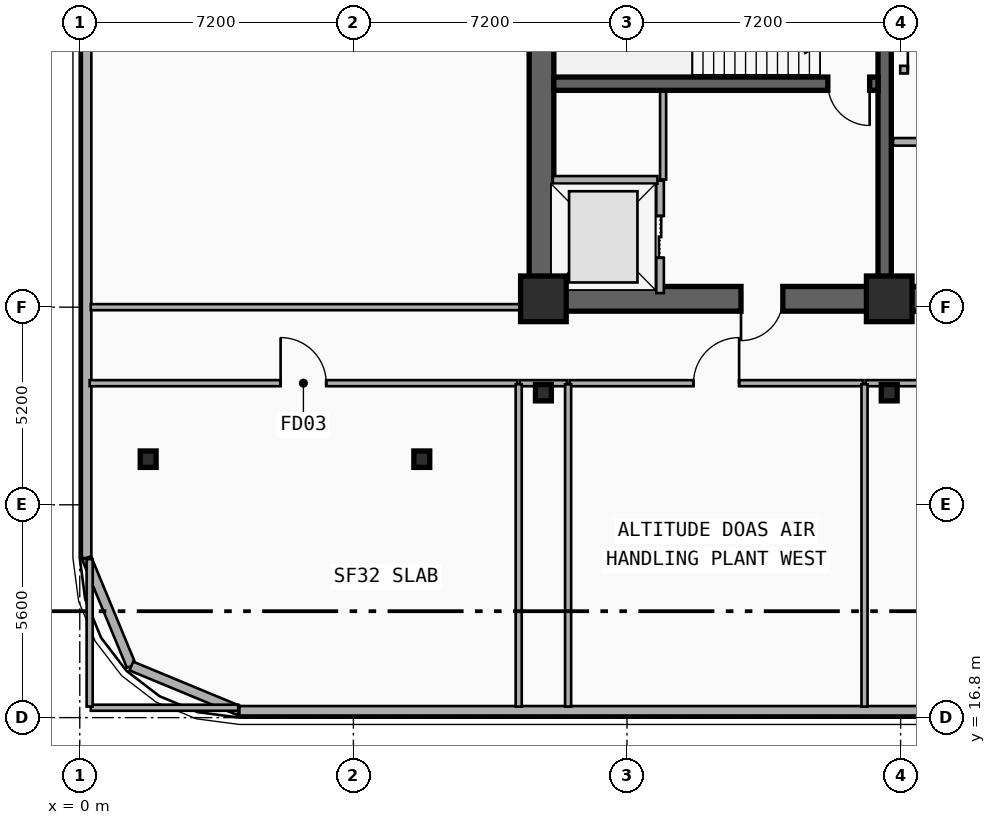
"""IFC4 building model, lengths in metres.
Left out: names, types, materials, properties, quantities, classifications, styles, units other than length and angle.
Written with IfcOpenShell. Run it as: python <this file> out.ifc"""

import sys

from ifc_helpers import new_model, si_unit, direction, frame, frame_2d, origin, origin_2d, place, context, subcontext, project, spatial, rectangle, i_section, extrude, element, fill, save


model = new_model("IFC4")
c1 = context("Model", 3, precision=1e-05, world=origin(), true_north=direction((0.0, 1.0)))
c2 = subcontext(c1, "Body", "Model", "MODEL_VIEW")
j1 = project(units=[si_unit("LENGTHUNIT", "METRE"), si_unit("PLANEANGLEUNIT", "RADIAN")], contexts=[c1])
p1 = place(None, origin())
s1 = spatial("IfcSite", under=j1, at=p1, CompositionType="ELEMENT")
p2 = place(p1, origin())
s2 = spatial("IfcBuilding", under=s1, at=p2, CompositionType="ELEMENT")
p3 = place(p2, frame((0.0, 0.0, 132.9)))
s3 = spatial("IfcBuildingStorey", under=s2, at=p3, CompositionType="ELEMENT", Elevation=132.9)
p4 = place(p3, frame((21.18, 27.82, 0.0), z_axis=(0.0, 0.0, 1.0), x_axis=(-1.0, 0.0, 0.0)))
e1 = element("IfcWall", 1, at=p4, inside=s3, PredefinedType="SHEAR", context=c2, shape_type="SweptSolid", body=[
    extrude(rectangle(XDim=9.03, YDim=0.65, at=frame_2d((4.515, 0.0))), origin(), (0.0, 0.0, 1.0), 4.8),
])
p5 = place(p4, frame((2.68, 0.0, 0.0)))
e2 = element("IfcOpeningElement", 2, at=p5, cuts=e1, PredefinedType="OPENING", context=c2, shape_type="SweptSolid", body=[
    extrude(rectangle(XDim=1.1, YDim=2.15, at=frame_2d((0.55, 1.075))), frame((0.0, 0.335, 0.0), z_axis=(0.0, -1.0, 0.0), x_axis=(1.0, 0.0, 0.0)), (0.0, 0.0, 1.0), 0.67),
])
p6 = place(p3, frame((33.15, 27.82, 0.0), z_axis=(0.0, 0.0, 1.0), x_axis=(-1.0, 0.0, 0.0)))
e3 = element("IfcWall", 3, at=p6, inside=s3, PredefinedType="SHEAR", context=c2, shape_type="SweptSolid", body=[
    extrude(rectangle(XDim=11.97, YDim=0.65, at=frame_2d((5.985, 0.0))), origin(), (0.0, 0.0, 1.0), 4.8),
])
p7 = place(p6, frame((6.1, 0.0, 0.0)))
e4 = element("IfcOpeningElement", 4, at=p7, cuts=e3, PredefinedType="OPENING", context=c2, shape_type="SweptSolid", body=[
    extrude(rectangle(XDim=1.6, YDim=2.2, at=frame_2d((0.8, 1.1))), frame((0.0, 0.335, 0.0), z_axis=(0.0, -1.0, 0.0), x_axis=(1.0, 0.0, 0.0)), (0.0, 0.0, 1.0), 0.67),
])
p8 = place(p3, frame((12.15, 28.145, 0.0), z_axis=(0.0, 0.0, 1.0), x_axis=(0.0, 1.0, 0.0)))
e5 = element("IfcWall", 5, at=p8, inside=s3, PredefinedType="SHEAR", context=c2, shape_type="SweptSolid", body=[
    extrude(rectangle(XDim=8.58, YDim=0.65, at=frame_2d((4.29, 0.0))), origin(), (0.0, 0.0, 1.0), 4.8),
])
p9 = place(p3, frame((21.18, 28.145, 0.0), z_axis=(0.0, 0.0, 1.0), x_axis=(0.0, 1.0, 0.0)))
e6 = element("IfcWall", 6, at=p9, inside=s3, PredefinedType="SHEAR", context=c2, shape_type="SweptSolid", body=[
    extrude(rectangle(XDim=8.58, YDim=0.35, at=frame_2d((4.29, 0.0))), origin(), (0.0, 0.0, 1.0), 4.8),
])
p10 = place(p3, frame((21.005, 33.48, 0.0), z_axis=(0.0, 0.0, 1.0), x_axis=(-1.0, 0.0, 0.0)))
e7 = element("IfcWall", 7, at=p10, inside=s3, PredefinedType="SHEAR", context=c2, shape_type="SweptSolid", body=[
    extrude(rectangle(XDim=8.53, YDim=0.35, at=frame_2d((4.265, 0.0))), origin(), (0.0, 0.0, 1.0), 4.8),
])
p11 = place(p10, frame((0.22, 0.0, 0.0)))
e8 = element("IfcOpeningElement", 8, at=p11, cuts=e7, PredefinedType="OPENING", context=c2, shape_type="SweptSolid", body=[
    extrude(rectangle(XDim=1.1, YDim=2.15, at=frame_2d((0.55, 1.075))), frame((0.0, 0.185, 0.0), z_axis=(0.0, -1.0, 0.0), x_axis=(1.0, 0.0, 0.0)), (0.0, 0.0, 1.0), 0.37),
])
for number, where, z_axis, x_axis in (
    (9, (12.2, 27.82, 0.0), (0.0, 0.0, 1.0), (1.0, 0.0, 0.0)),
    (10, (21.3, 27.82, 0.0), (0.0, 0.0, 1.0), (1.0, 0.0, 0.0)),
):
    element("IfcColumn", number, at=place(p3, frame(where, z_axis=z_axis, x_axis=x_axis)), inside=s3, PredefinedType="COLUMN", context=c2, shape_type="SweptSolid", body=[
        extrude(rectangle(XDim=1.2, YDim=1.2, at=origin_2d()), origin(), (0.0, 0.0, 1.0), 4.8),
    ])
for number, where, z_axis, x_axis in (
    (11, (12.2, 25.35, 0.0), (0.0, 0.0, 1.0), (1.0, 0.0, 0.0)),
    (12, (21.3, 25.35, 0.0), (0.0, 0.0, 1.0), (1.0, 0.0, 0.0)),
    (13, (9.0, 23.6, 0.0), (0.0, 0.0, 1.0), (1.0, 0.0, 0.0)),
    (14, (1.8, 23.6, 0.0), (0.0, 0.0, 1.0), (1.0, 0.0, 0.0)),
):
    element("IfcColumn", number, at=place(p3, frame(where, z_axis=z_axis, x_axis=x_axis)), inside=s3, PredefinedType="COLUMN", context=c2, shape_type="SweptSolid", body=[
        extrude(i_section(OverallWidth=0.418, OverallDepth=0.432, WebThickness=0.035, FlangeThickness=0.056, FilletRadius=0.015, at=origin_2d()), origin(), (0.0, 0.0, 1.0), 4.8),
    ])
p12 = place(p3, frame((0.18, 21.0, 0.0), z_axis=(0.0, 0.0, 1.0), x_axis=(0.0, 1.0, 0.0)))
e15 = element("IfcWall", 15, at=p12, inside=s3, PredefinedType="SOLIDWALL", context=c2, shape_type="SweptSolid", body=[
    extrude(rectangle(XDim=18.0, YDim=0.25, at=frame_2d((9.0, 0.0))), origin(), (0.0, 0.0, 1.0), 4.48),
])
for number, where, z_axis, x_axis in (
    (16, (1.357, 18.157, 0.0), (0.0, 0.0, 1.0), (-0.383, 0.924, 0.0)),
    (17, (4.2, 16.98, 0.0), (0.0, 0.0, 1.0), (-0.924, 0.383, 0.0)),
):
    element("IfcWall", number, at=place(p3, frame(where, z_axis=z_axis, x_axis=x_axis)), inside=s3, PredefinedType="SOLIDWALL", context=c2, shape_type="SweptSolid", body=[
        extrude(rectangle(XDim=3.077, YDim=0.25, at=frame_2d((1.538, 0.0))), origin(), (0.0, 0.0, 1.0), 4.48),
    ])
p13 = place(p3, frame((53.4, 16.98, 0.0), z_axis=(0.0, 0.0, 1.0), x_axis=(-1.0, 0.0, 0.0)))
e18 = element("IfcWall", 18, at=p13, inside=s3, PredefinedType="SOLIDWALL", context=c2, shape_type="SweptSolid", body=[
    extrude(rectangle(XDim=49.2, YDim=0.25, at=frame_2d((24.6, 0.0))), origin(), (0.0, 0.0, 1.0), 3.92),
])
p14 = place(p3, frame((15.27, 27.97, 0.0), z_axis=(0.0, 0.0, 1.0), x_axis=(0.0, 1.0, 0.0)))
e19 = element("IfcWall", 19, at=p14, inside=s3, PredefinedType="PARTITIONING", context=c2, shape_type="SweptSolid", body=[
    extrude(rectangle(XDim=2.96, YDim=0.2, at=frame_2d((1.48, 0.0))), origin(), (0.0, 0.0, 1.0), 3.452),
])
p15 = place(p14, frame((0.93, 0.0, 0.0)))
e20 = element("IfcOpeningElement", 20, at=p15, cuts=e19, PredefinedType="OPENING", context=c2, shape_type="SweptSolid", body=[
    extrude(rectangle(XDim=1.1, YDim=2.15, at=frame_2d((0.55, 1.075))), frame((0.0, 0.11, 0.0), z_axis=(0.0, -1.0, 0.0), x_axis=(1.0, 0.0, 0.0)), (0.0, 0.0, 1.0), 0.22),
])
p16 = place(p3, frame((12.45, 30.95, 0.0), z_axis=(0.0, 0.0, 1.0), x_axis=(1.0, 0.0, 0.0)))
e21 = element("IfcWall", 21, at=p16, inside=s3, PredefinedType="PARTITIONING", context=c2, shape_type="SweptSolid", body=[
    extrude(rectangle(XDim=2.75, YDim=0.2, at=frame_2d((1.375, 0.0))), origin(), (0.0, 0.0, 1.0), 3.452),
])
p17 = place(p3, frame((21.4, 31.95, 0.0), z_axis=(0.0, 0.0, 1.0), x_axis=(1.0, 0.0, 0.0)))
e22 = element("IfcWall", 22, at=p17, inside=s3, PredefinedType="PARTITIONING", context=c2, shape_type="SweptSolid", body=[
    extrude(rectangle(XDim=3.66, YDim=0.2, at=frame_2d((1.83, 0.0))), origin(), (0.0, 0.0, 1.0), 3.452),
])
p18 = place(p17, frame((1.23, 0.0, 0.0)))
e23 = element("IfcOpeningElement", 23, at=p18, cuts=e22, PredefinedType="OPENING", context=c2, shape_type="SweptSolid", body=[
    extrude(rectangle(XDim=1.2, YDim=2.15, at=frame_2d((0.6, 1.075))), frame((0.0, 0.11, 0.0), z_axis=(0.0, -1.0, 0.0), x_axis=(1.0, 0.0, 0.0)), (0.0, 0.0, 1.0), 0.22),
])
p19 = place(p3, frame((21.59, 33.85, 0.0), z_axis=(0.0, 0.0, 1.0), x_axis=(1.0, 0.0, 0.0)))
e24 = element("IfcWall", 24, at=p19, inside=s3, PredefinedType="PARTITIONING", context=c2, shape_type="SweptSolid", body=[
    extrude(rectangle(XDim=2.92, YDim=0.2, at=frame_2d((1.46, 0.0))), origin(), (0.0, 0.0, 1.0), 3.452),
])
p20 = place(p19, frame((0.2, 0.0, 0.0)))
e25 = element("IfcOpeningElement", 25, at=p20, cuts=e24, PredefinedType="OPENING", context=c2, shape_type="SweptSolid", body=[
    extrude(rectangle(XDim=1.2, YDim=2.15, at=frame_2d((0.6, 1.075))), frame((0.0, 0.11, 0.0), z_axis=(0.0, -1.0, 0.0), x_axis=(1.0, 0.0, 0.0)), (0.0, 0.0, 1.0), 0.22),
])
p21 = place(p3, frame((0.26, 25.6, 0.0), z_axis=(0.0, 0.0, 1.0), x_axis=(1.0, 0.0, 0.0)))
e26 = element("IfcWall", 26, at=p21, inside=s3, PredefinedType="PARTITIONING", context=c2, shape_type="SweptSolid", body=[
    extrude(rectangle(XDim=11.25, YDim=0.16, at=frame_2d((5.625, 0.0))), origin(), (0.0, 0.0, 1.0), 3.81),
])
p22 = place(p21, frame((5.025, 0.0, 0.0)))
e27 = element("IfcOpeningElement", 27, at=p22, cuts=e26, PredefinedType="OPENING", context=c2, shape_type="SweptSolid", body=[
    extrude(rectangle(XDim=1.2, YDim=2.15, at=frame_2d((0.6, 1.075))), frame((0.0, 0.09, 0.0), z_axis=(0.0, -1.0, 0.0), x_axis=(1.0, 0.0, 0.0)), (0.0, 0.0, 1.0), 0.18),
])
p23 = place(p3, frame((12.89, 25.6, 0.0), z_axis=(0.0, 0.0, 1.0), x_axis=(1.0, 0.0, 0.0)))
e28 = element("IfcWall", 28, at=p23, inside=s3, PredefinedType="PARTITIONING", context=c2, shape_type="SweptSolid", body=[
    extrude(rectangle(XDim=7.72, YDim=0.16, at=frame_2d((3.86, 0.0))), origin(), (0.0, 0.0, 1.0), 4.48),
])
p24 = place(p23, frame((3.26, 0.0, 0.0)))
e29 = element("IfcOpeningElement", 29, at=p24, cuts=e28, PredefinedType="OPENING", context=c2, shape_type="SweptSolid", body=[
    extrude(rectangle(XDim=1.2, YDim=2.15, at=frame_2d((0.6, 1.075))), frame((0.0, 0.09, 0.0), z_axis=(0.0, -1.0, 0.0), x_axis=(1.0, 0.0, 0.0)), (0.0, 0.0, 1.0), 0.18),
])
p25 = place(p3, frame((15.35, 30.96, 0.0), z_axis=(0.0, 0.0, 1.0), x_axis=(0.0, 1.0, 0.0)))
e30 = element("IfcWall", 30, at=p25, inside=s3, PredefinedType="PARTITIONING", context=c2, shape_type="SweptSolid", body=[
    extrude(rectangle(XDim=2.31, YDim=0.16, at=frame_2d((1.155, 0.0))), origin(), (0.0, 0.0, 1.0), 4.48),
])
p26 = place(p3, frame((11.58, 25.6, 0.0), z_axis=(0.0, 0.0, 1.0), x_axis=(1.0, 0.0, 0.0)))
e31 = element("IfcWall", 31, at=p26, inside=s3, PredefinedType="PARTITIONING", context=c2, shape_type="SweptSolid", body=[
    extrude(rectangle(XDim=1.24, YDim=0.16, at=frame_2d((0.62, 0.0))), origin(), (0.0, 0.0, 1.0), 3.646),
])
p27 = place(p3, frame((20.68, 25.6, 0.0), z_axis=(0.0, 0.0, 1.0), x_axis=(1.0, 0.0, 0.0)))
e32 = element("IfcWall", 32, at=p27, inside=s3, PredefinedType="PARTITIONING", context=c2, shape_type="SweptSolid", body=[
    extrude(rectangle(XDim=16.29, YDim=0.16, at=frame_2d((8.145, 0.0))), origin(), (0.0, 0.0, 1.0), 3.646),
])
p28 = place(p3, frame((0.29, 27.6, 0.0), z_axis=(0.0, 0.0, 1.0), x_axis=(1.0, 0.0, 0.0)))
e33 = element("IfcWall", 33, at=p28, inside=s3, PredefinedType="PARTITIONING", context=c2, shape_type="SweptSolid", body=[
    extrude(rectangle(XDim=11.83, YDim=0.16, at=frame_2d((5.915, 0.0))), origin(), (0.0, 0.0, 1.0), 3.452),
])
p29 = place(p3, frame((0.29, 17.06, 0.0), z_axis=(0.0, 0.0, 1.0), x_axis=(1.0, 0.0, 0.0)))
e34 = element("IfcWall", 34, at=p29, inside=s3, PredefinedType="PARTITIONING", context=c2, shape_type="SweptSolid", body=[
    extrude(rectangle(XDim=3.88, YDim=0.16, at=frame_2d((1.94, 0.0))), origin(), (0.0, 0.0, 1.0), 3.96),
])
p30 = place(p3, frame((0.26, 17.09, 0.0), z_axis=(0.0, 0.0, 1.0), x_axis=(0.0, 1.0, 0.0)))
e35 = element("IfcWall", 35, at=p30, inside=s3, PredefinedType="PARTITIONING", context=c2, shape_type="SweptSolid", body=[
    extrude(rectangle(XDim=3.88, YDim=0.16, at=frame_2d((1.94, 0.0))), origin(), (0.0, 0.0, 1.0), 4.48),
])
p31 = place(p3, frame((11.55, 17.09, 0.0), z_axis=(0.0, 0.0, 1.0), x_axis=(0.0, 1.0, 0.0)))
e36 = element("IfcWall", 36, at=p31, inside=s3, PredefinedType="PARTITIONING", context=c2, shape_type="SweptSolid", body=[
    extrude(rectangle(XDim=8.48, YDim=0.16, at=frame_2d((4.24, 0.0))), origin(), (0.0, 0.0, 1.0), 3.96),
])
for number, where, z_axis, x_axis in (
    (37, (12.85, 17.09, 0.0), (0.0, 0.0, 1.0), (0.0, 1.0, 0.0)),
    (38, (20.65, 17.09, 0.0), (0.0, 0.0, 1.0), (0.0, 1.0, 0.0)),
):
    element("IfcWall", number, at=place(p3, frame(where, z_axis=z_axis, x_axis=x_axis)), inside=s3, PredefinedType="PARTITIONING", context=c2, shape_type="SweptSolid", body=[
        extrude(rectangle(XDim=8.48, YDim=0.16, at=frame_2d((4.24, 0.0))), origin(), (0.0, 0.0, 1.0), 3.97),
    ])
p32 = place(p15, origin())
e39 = element("IfcDoor", 39, at=p32, inside=s3, OperationType="DOUBLE_DOOR_SLIDING", PredefinedType="DOOR", context=c2, shape_type="SweptSolid", body=[
    extrude(rectangle(XDim=1.1, YDim=2.15, at=frame_2d((0.55, 1.075))), frame((0.0, 0.025, 0.0), z_axis=(0.0, -1.0, 0.0), x_axis=(1.0, 0.0, 0.0)), (0.0, 0.0, 1.0), 0.05),
])
fill(e20, e39)
p33 = place(p11, origin())
e40 = element("IfcDoor", 40, at=p33, inside=s3, OperationType="SINGLE_SWING_LEFT", PredefinedType="DOOR", context=c2, shape_type="SweptSolid", body=[
    extrude(rectangle(XDim=1.1, YDim=2.15, at=frame_2d((0.55, 1.075))), frame((0.0, 0.025, 0.0), z_axis=(0.0, -1.0, 0.0), x_axis=(1.0, 0.0, 0.0)), (0.0, 0.0, 1.0), 0.05),
])
fill(e8, e40)
p34 = place(p5, origin())
e41 = element("IfcDoor", 41, at=p34, inside=s3, OperationType="SINGLE_SWING_RIGHT", PredefinedType="DOOR", context=c2, shape_type="SweptSolid", body=[
    extrude(rectangle(XDim=1.1, YDim=2.15, at=frame_2d((0.55, 1.075))), frame((0.0, 0.025, 0.0), z_axis=(0.0, -1.0, 0.0), x_axis=(1.0, 0.0, 0.0)), (0.0, 0.0, 1.0), 0.05),
])
fill(e2, e41)
p35 = place(p20, origin())
e42 = element("IfcDoor", 42, at=p35, inside=s3, OperationType="SINGLE_SWING_LEFT", PredefinedType="DOOR", context=c2, shape_type="SweptSolid", body=[
    extrude(rectangle(XDim=1.2, YDim=2.15, at=frame_2d((0.6, 1.075))), frame((0.0, 0.025, 0.0), z_axis=(0.0, -1.0, 0.0), x_axis=(1.0, 0.0, 0.0)), (0.0, 0.0, 1.0), 0.05),
])
fill(e25, e42)
p36 = place(p22, origin())
e43 = element("IfcDoor", 43, at=p36, inside=s3, OperationType="SINGLE_SWING_LEFT", PredefinedType="DOOR", context=c2, shape_type="SweptSolid", body=[
    extrude(rectangle(XDim=1.2, YDim=2.15, at=frame_2d((0.6, 1.075))), frame((0.0, 0.025, 0.0), z_axis=(0.0, -1.0, 0.0), x_axis=(1.0, 0.0, 0.0)), (0.0, 0.0, 1.0), 0.05),
])
fill(e27, e43)
p37 = place(p24, origin())
e44 = element("IfcDoor", 44, at=p37, inside=s3, OperationType="SINGLE_SWING_RIGHT", PredefinedType="DOOR", context=c2, shape_type="SweptSolid", body=[
    extrude(rectangle(XDim=1.2, YDim=2.15, at=frame_2d((0.6, 1.075))), frame((0.0, 0.025, 0.0), z_axis=(0.0, -1.0, 0.0), x_axis=(1.0, 0.0, 0.0)), (0.0, 0.0, 1.0), 0.05),
])
fill(e29, e44)
save(model, sys.argv[1])
